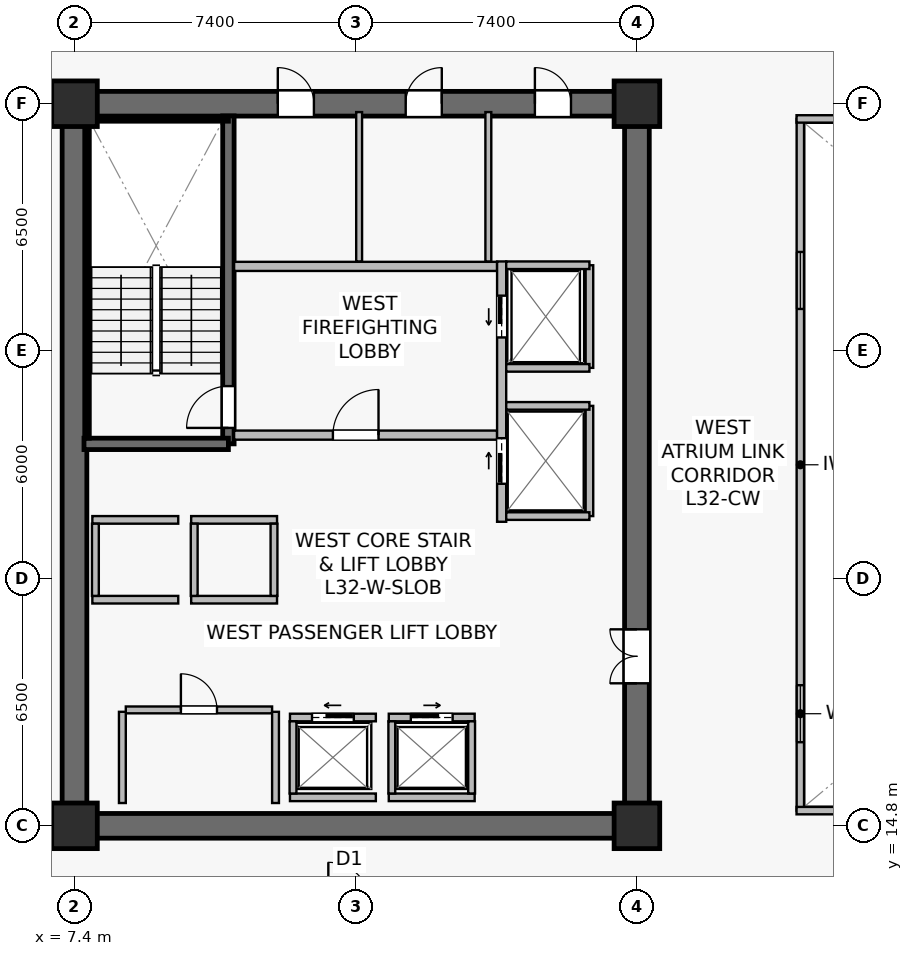
"""IFC4 building model, lengths in metres.
Left out: names, types, materials, properties, quantities, classifications, styles, units other than length and angle.
Written with IfcOpenShell. Run it as: python <this file> out.ifc"""

import sys

from ifc_helpers import new_model, si_unit, direction, frame, frame_2d, origin, origin_2d, place, context, subcontext, project, spatial, rectangle, extrude, source, transform, mapped, element, fill, save


model = new_model("IFC4")
c1 = context("Model", 3, precision=1e-05, world=origin(), true_north=direction((0.0, 1.0)))
c2 = subcontext(c1, "Body", "Model", "MODEL_VIEW")
j1 = project(units=[si_unit("LENGTHUNIT", "METRE"), si_unit("PLANEANGLEUNIT", "RADIAN")], contexts=[c1])
p1 = place(None, origin())
s1 = spatial("IfcSite", under=j1, at=p1, CompositionType="ELEMENT")
p2 = place(p1, origin())
s2 = spatial("IfcBuilding", under=s1, at=p2, CompositionType="ELEMENT")
p3 = place(p2, frame((0.0, 0.0, 133.8)))
s3 = spatial("IfcBuildingStorey", under=s2, at=p3, CompositionType="ELEMENT", Elevation=133.8)
p4 = place(p3, frame((7.075, 14.8, 0.0), z_axis=(0.0, 0.0, 1.0), x_axis=(1.0, 0.0, 0.0)))
e1 = element("IfcWall", 1, at=p4, inside=s3, PredefinedType="SHEAR", context=c2, shape_type="SweptSolid", body=[
    extrude(rectangle(XDim=15.45, YDim=0.65, at=frame_2d((7.725, 0.0))), origin(), (0.0, 0.0, 1.0), 3.79),
])
p5 = place(p3, frame((7.075, 33.8, 0.0), z_axis=(0.0, 0.0, 1.0), x_axis=(1.0, 0.0, 0.0)))
e2 = element("IfcWall", 2, at=p5, inside=s3, PredefinedType="SHEAR", context=c2, shape_type="SweptSolid", body=[
    extrude(rectangle(XDim=15.45, YDim=0.65, at=frame_2d((7.725, 0.0))), origin(), (0.0, 0.0, 1.0), 3.79),
])
p6 = place(p5, frame((5.675, 0.0, 0.0)))
e3 = element("IfcOpeningElement", 3, at=p6, cuts=e2, PredefinedType="OPENING", context=c2, shape_type="SweptSolid", body=[
    extrude(rectangle(XDim=0.95, YDim=2.15, at=frame_2d((0.475, 1.075))), frame((0.0, 0.335, 0.0), z_axis=(0.0, -1.0, 0.0), x_axis=(1.0, 0.0, 0.0)), (0.0, 0.0, 1.0), 0.67),
])
p7 = place(p5, frame((9.04, 0.0, 0.0)))
e4 = element("IfcOpeningElement", 4, at=p7, cuts=e2, PredefinedType="OPENING", context=c2, shape_type="SweptSolid", body=[
    extrude(rectangle(XDim=0.95, YDim=2.15, at=frame_2d((0.475, 1.075))), frame((0.0, 0.335, 0.0), z_axis=(0.0, -1.0, 0.0), x_axis=(1.0, 0.0, 0.0)), (0.0, 0.0, 1.0), 0.67),
])
p8 = place(p5, frame((12.44, 0.0, 0.0)))
e5 = element("IfcOpeningElement", 5, at=p8, cuts=e2, PredefinedType="OPENING", context=c2, shape_type="SweptSolid", body=[
    extrude(rectangle(XDim=0.95, YDim=2.15, at=frame_2d((0.475, 1.075))), frame((0.0, 0.335, 0.0), z_axis=(0.0, -1.0, 0.0), x_axis=(1.0, 0.0, 0.0)), (0.0, 0.0, 1.0), 0.67),
])
p9 = place(p3, frame((7.4, 15.125, 0.0), z_axis=(0.0, 0.0, 1.0), x_axis=(0.0, 1.0, 0.0)))
e6 = element("IfcWall", 6, at=p9, inside=s3, PredefinedType="SHEAR", context=c2, shape_type="SweptSolid", body=[
    extrude(rectangle(XDim=18.35, YDim=0.65, at=frame_2d((9.175, 0.0))), origin(), (0.0, 0.0, 1.0), 3.79),
])
p10 = place(p3, frame((22.2, 15.125, 0.0), z_axis=(0.0, 0.0, 1.0), x_axis=(0.0, 1.0, 0.0)))
e7 = element("IfcWall", 7, at=p10, inside=s3, PredefinedType="SHEAR", context=c2, shape_type="SweptSolid", body=[
    extrude(rectangle(XDim=18.35, YDim=0.65, at=frame_2d((9.175, 0.0))), origin(), (0.0, 0.0, 1.0), 3.79),
])
p11 = place(p10, frame((3.425, 0.0, 0.0)))
e8 = element("IfcOpeningElement", 8, at=p11, cuts=e7, PredefinedType="OPENING", context=c2, shape_type="SweptSolid", body=[
    extrude(rectangle(XDim=1.42, YDim=2.2, at=frame_2d((0.71, 1.1))), frame((0.0, 0.335, 0.0), z_axis=(0.0, -1.0, 0.0), x_axis=(1.0, 0.0, 0.0)), (0.0, 0.0, 1.0), 0.67),
])
p12 = place(p3, frame((11.45, 24.85, 0.0), z_axis=(0.0, 0.0, 1.0), x_axis=(0.0, 1.0, 0.0)))
e9 = element("IfcWall", 9, at=p12, inside=s3, PredefinedType="SHEAR", context=c2, shape_type="SweptSolid", body=[
    extrude(rectangle(XDim=8.63, YDim=0.3, at=frame_2d((4.315, 0.0))), origin(), (0.0, 0.0, 1.0), 3.79),
])
p13 = place(p12, frame((0.42, 0.0, 0.0)))
e10 = element("IfcOpeningElement", 10, at=p13, cuts=e9, PredefinedType="OPENING", context=c2, shape_type="SweptSolid", body=[
    extrude(rectangle(XDim=1.1, YDim=2.15, at=frame_2d((0.55, 1.075))), frame((0.0, 0.16, 0.0), z_axis=(0.0, -1.0, 0.0), x_axis=(1.0, 0.0, 0.0)), (0.0, 0.0, 1.0), 0.32),
])
p14 = place(p3, frame((7.65, 24.85, 0.0), z_axis=(0.0, 0.0, 1.0), x_axis=(1.0, 0.0, 0.0)))
e11 = element("IfcWall", 11, at=p14, inside=s3, PredefinedType="SHEAR", context=c2, shape_type="SweptSolid", body=[
    extrude(rectangle(XDim=3.8, YDim=0.3, at=frame_2d((1.9, 0.0))), origin(), (0.0, 0.0, 1.0), 3.79),
])
p15 = place(p3, frame((7.73, 33.4, 0.0), z_axis=(0.0, 0.0, 1.0), x_axis=(1.0, 0.0, 0.0)))
e12 = element("IfcWall", 12, at=p15, inside=s3, PredefinedType="SOLIDWALL", context=c2, shape_type="SweptSolid", body=[
    extrude(rectangle(XDim=3.72, YDim=0.12, at=frame_2d((1.86, 0.0))), origin(), (0.0, 0.0, 1.0), 3.79),
])
p16 = place(p3, frame((7.73, 25.0, 0.0), z_axis=(0.0, 0.0, 1.0), x_axis=(0.0, 1.0, 0.0)))
e13 = element("IfcWall", 13, at=p16, inside=s3, PredefinedType="SOLIDWALL", context=c2, shape_type="SweptSolid", body=[
    extrude(rectangle(XDim=8.32, YDim=0.12, at=frame_2d((4.16, 0.0))), origin(), (0.0, 0.0, 1.0), 3.79),
])
m1 = source(origin(), c2, "Body", "SweptSolid", [
    extrude(rectangle(XDim=1.2, YDim=1.2, at=origin_2d()), origin(), (0.0, 0.0, 1.0), 4.1),
])
for number, where, z_axis, x_axis in (
    (14, (7.4, 14.8, 0.0), (0.0, 0.0, 1.0), (1.0, 0.0, 0.0)),
    (15, (22.2, 14.8, 0.0), (0.0, 0.0, 1.0), (1.0, 0.0, 0.0)),
    (16, (7.4, 33.8, 0.0), (0.0, 0.0, 1.0), (1.0, 0.0, 0.0)),
    (17, (22.2, 33.8, 0.0), (0.0, 0.0, 1.0), (1.0, 0.0, 0.0)),
):
    element("IfcColumn", number, at=place(p3, frame(where, z_axis=z_axis, x_axis=x_axis)), inside=s3, PredefinedType="COLUMN", context=c2, shape_type="MappedRepresentation", body=[
        mapped(m1, transform((0.0, 0.0, 0.0), scale=1.0)),
    ])
p17 = place(p3, frame((11.6, 25.08, 0.0), z_axis=(0.0, 0.0, 1.0), x_axis=(1.0, 0.0, 0.0)))
e18 = element("IfcWall", 18, at=p17, inside=s3, PredefinedType="SOLIDWALL", context=c2, shape_type="SweptSolid", body=[
    extrude(rectangle(XDim=6.92, YDim=0.24, at=frame_2d((3.46, 0.0))), origin(), (0.0, 0.0, 1.0), 3.125),
])
p18 = place(p17, frame((2.6, 0.0, 0.0)))
e19 = element("IfcOpeningElement", 19, at=p18, cuts=e18, PredefinedType="OPENING", context=c2, shape_type="SweptSolid", body=[
    extrude(rectangle(XDim=1.2, YDim=2.16, at=frame_2d((0.6, 1.08))), frame((0.0, 0.13, 0.0), z_axis=(0.0, -1.0, 0.0), x_axis=(1.0, 0.0, 0.0)), (0.0, 0.0, 1.0), 0.26),
])
p19 = place(p3, frame((11.6, 29.52, 0.0), z_axis=(0.0, 0.0, 1.0), x_axis=(1.0, 0.0, 0.0)))
e20 = element("IfcWall", 20, at=p19, inside=s3, PredefinedType="SOLIDWALL", context=c2, shape_type="SweptSolid", body=[
    extrude(rectangle(XDim=6.92, YDim=0.24, at=frame_2d((3.46, 0.0))), origin(), (0.0, 0.0, 1.0), 3.125),
])
p20 = place(p3, frame((18.64, 22.8, 0.0), z_axis=(0.0, 0.0, 1.0), x_axis=(0.0, 1.0, 0.0)))
e21 = element("IfcWall", 21, at=p20, inside=s3, PredefinedType="SOLIDWALL", context=c2, shape_type="SweptSolid", body=[
    extrude(rectangle(XDim=6.85, YDim=0.24, at=frame_2d((3.425, 0.0))), origin(), (0.0, 0.0, 1.0), 2.875),
])
p21 = place(p20, frame((4.85, 0.0, 0.0)))
e22 = element("IfcOpeningElement", 22, at=p21, cuts=e21, PredefinedType="OPENING", context=c2, shape_type="SweptSolid", body=[
    extrude(rectangle(XDim=1.1, YDim=2.22, at=frame_2d((0.55, 1.11))), frame((0.0, 0.13, 0.0), z_axis=(0.0, -1.0, 0.0), x_axis=(1.0, 0.0, 0.0)), (0.0, 0.0, 1.0), 0.26),
])
p22 = place(p20, frame((1.0, 0.0, 0.0)))
e23 = element("IfcOpeningElement", 23, at=p22, cuts=e21, PredefinedType="OPENING", context=c2, shape_type="SweptSolid", body=[
    extrude(rectangle(XDim=1.2, YDim=2.22, at=frame_2d((0.6, 1.11))), frame((0.0, 0.13, 0.0), z_axis=(0.0, -1.0, 0.0), x_axis=(1.0, 0.0, 0.0)), (0.0, 0.0, 1.0), 0.26),
])
p23 = place(p3, frame((13.07, 17.65, 0.0), z_axis=(0.0, 0.0, 1.0), x_axis=(1.0, 0.0, 0.0)))
e24 = element("IfcWall", 24, at=p23, inside=s3, PredefinedType="SOLIDWALL", context=c2, shape_type="SweptSolid", body=[
    extrude(rectangle(XDim=2.26, YDim=0.2, at=frame_2d((1.13, 0.0))), origin(), (0.0, 0.0, 1.0), 3.125),
])
p24 = place(p23, frame((0.58, 0.0, 0.0)))
e25 = element("IfcOpeningElement", 25, at=p24, cuts=e24, PredefinedType="OPENING", context=c2, shape_type="SweptSolid", body=[
    extrude(rectangle(XDim=1.1, YDim=2.22, at=frame_2d((0.55, 1.11))), frame((0.0, 0.11, 0.0), z_axis=(0.0, -1.0, 0.0), x_axis=(1.0, 0.0, 0.0)), (0.0, 0.0, 1.0), 0.22),
])
p25 = place(p3, frame((13.07, 15.55, 0.0), z_axis=(0.0, 0.0, 1.0), x_axis=(1.0, 0.0, 0.0)))
e26 = element("IfcWall", 26, at=p25, inside=s3, PredefinedType="SOLIDWALL", context=c2, shape_type="SweptSolid", body=[
    extrude(rectangle(XDim=2.26, YDim=0.2, at=frame_2d((1.13, 0.0))), origin(), (0.0, 0.0, 1.0), 3.125),
])
p26 = place(p3, frame((13.15, 15.65, 0.0), z_axis=(0.0, 0.0, 1.0), x_axis=(0.0, 1.0, 0.0)))
e27 = element("IfcWall", 27, at=p26, inside=s3, PredefinedType="SOLIDWALL", context=c2, shape_type="SweptSolid", body=[
    extrude(rectangle(XDim=1.9, YDim=0.18, at=frame_2d((0.95, 0.0))), origin(), (0.0, 0.0, 1.0), 3.79),
])
p27 = place(p3, frame((15.67, 17.65, 0.0), z_axis=(0.0, 0.0, 1.0), x_axis=(1.0, 0.0, 0.0)))
e28 = element("IfcWall", 28, at=p27, inside=s3, PredefinedType="SOLIDWALL", context=c2, shape_type="SweptSolid", body=[
    extrude(rectangle(XDim=2.26, YDim=0.2, at=frame_2d((1.13, 0.0))), origin(), (0.0, 0.0, 1.0), 3.79),
])
p28 = place(p27, frame((0.58, 0.0, 0.0)))
e29 = element("IfcOpeningElement", 29, at=p28, cuts=e28, PredefinedType="OPENING", context=c2, shape_type="SweptSolid", body=[
    extrude(rectangle(XDim=1.1, YDim=2.22, at=frame_2d((0.55, 1.11))), frame((0.0, 0.11, 0.0), z_axis=(0.0, -1.0, 0.0), x_axis=(1.0, 0.0, 0.0)), (0.0, 0.0, 1.0), 0.22),
])
p29 = place(p3, frame((15.67, 15.55, 0.0), z_axis=(0.0, 0.0, 1.0), x_axis=(1.0, 0.0, 0.0)))
e30 = element("IfcWall", 30, at=p29, inside=s3, PredefinedType="SOLIDWALL", context=c2, shape_type="SweptSolid", body=[
    extrude(rectangle(XDim=2.26, YDim=0.2, at=frame_2d((1.13, 0.0))), origin(), (0.0, 0.0, 1.0), 3.79),
])
for number, where, z_axis, x_axis in (
    (31, (15.75, 15.65, 0.0), (0.0, 0.0, 1.0), (0.0, 1.0, 0.0)),
    (32, (17.85, 15.65, 0.0), (0.0, 0.0, 1.0), (0.0, 1.0, 0.0)),
):
    element("IfcWall", number, at=place(p3, frame(where, z_axis=z_axis, x_axis=x_axis)), inside=s3, PredefinedType="SOLIDWALL", context=c2, shape_type="SweptSolid", body=[
        extrude(rectangle(XDim=1.9, YDim=0.18, at=frame_2d((0.95, 0.0))), origin(), (0.0, 0.0, 1.0), 3.79),
    ])
for number, where, z_axis, x_axis in (
    (33, (7.87, 20.75, 0.0), (0.0, 0.0, 1.0), (1.0, 0.0, 0.0)),
    (34, (7.87, 22.85, 0.0), (0.0, 0.0, 1.0), (1.0, 0.0, 0.0)),
):
    element("IfcWall", number, at=place(p3, frame(where, z_axis=z_axis, x_axis=x_axis)), inside=s3, PredefinedType="SOLIDWALL", context=c2, shape_type="SweptSolid", body=[
        extrude(rectangle(XDim=2.26, YDim=0.2, at=frame_2d((1.13, 0.0))), origin(), (0.0, 0.0, 1.0), 3.79),
    ])
p30 = place(p3, frame((7.95, 20.85, 0.0), z_axis=(0.0, 0.0, 1.0), x_axis=(0.0, 1.0, 0.0)))
e35 = element("IfcWall", 35, at=p30, inside=s3, PredefinedType="SOLIDWALL", context=c2, shape_type="SweptSolid", body=[
    extrude(rectangle(XDim=1.9, YDim=0.18, at=frame_2d((0.95, 0.0))), origin(), (0.0, 0.0, 1.0), 3.79),
])
for number, where, z_axis, x_axis in (
    (36, (10.47, 20.75, 0.0), (0.0, 0.0, 1.0), (1.0, 0.0, 0.0)),
    (37, (10.47, 22.85, 0.0), (0.0, 0.0, 1.0), (1.0, 0.0, 0.0)),
):
    element("IfcWall", number, at=place(p3, frame(where, z_axis=z_axis, x_axis=x_axis)), inside=s3, PredefinedType="SOLIDWALL", context=c2, shape_type="SweptSolid", body=[
        extrude(rectangle(XDim=2.26, YDim=0.2, at=frame_2d((1.13, 0.0))), origin(), (0.0, 0.0, 1.0), 3.79),
    ])
for number, where, z_axis, x_axis in (
    (38, (10.55, 20.85, 0.0), (0.0, 0.0, 1.0), (0.0, 1.0, 0.0)),
    (39, (12.65, 20.85, 0.0), (0.0, 0.0, 1.0), (0.0, 1.0, 0.0)),
):
    element("IfcWall", number, at=place(p3, frame(where, z_axis=z_axis, x_axis=x_axis)), inside=s3, PredefinedType="SOLIDWALL", context=c2, shape_type="SweptSolid", body=[
        extrude(rectangle(XDim=1.9, YDim=0.18, at=frame_2d((0.95, 0.0))), origin(), (0.0, 0.0, 1.0), 3.79),
    ])
p31 = place(p3, frame((20.95, 26.85, 0.0), z_axis=(0.0, 0.0, 1.0), x_axis=(0.0, 1.0, 0.0)))
e40 = element("IfcWall", 40, at=p31, inside=s3, PredefinedType="SOLIDWALL", context=c2, shape_type="SweptSolid", body=[
    extrude(rectangle(XDim=2.7, YDim=0.2, at=frame_2d((1.35, 0.0))), origin(), (0.0, 0.0, 1.0), 3.79),
])
p32 = place(p3, frame((18.76, 29.55, 0.0), z_axis=(0.0, 0.0, 1.0), x_axis=(1.0, 0.0, 0.0)))
e41 = element("IfcWall", 41, at=p32, inside=s3, PredefinedType="SOLIDWALL", context=c2, shape_type="SweptSolid", body=[
    extrude(rectangle(XDim=2.19, YDim=0.2, at=frame_2d((1.095, 0.0))), origin(), (0.0, 0.0, 1.0), 3.79),
])
p33 = place(p3, frame((18.76, 26.85, 0.0), z_axis=(0.0, 0.0, 1.0), x_axis=(1.0, 0.0, 0.0)))
e42 = element("IfcWall", 42, at=p33, inside=s3, PredefinedType="SOLIDWALL", context=c2, shape_type="SweptSolid", body=[
    extrude(rectangle(XDim=2.19, YDim=0.2, at=frame_2d((1.095, 0.0))), origin(), (0.0, 0.0, 1.0), 3.187),
])
p34 = place(p3, frame((20.95, 22.95, 0.0), z_axis=(0.0, 0.0, 1.0), x_axis=(0.0, 1.0, 0.0)))
e43 = element("IfcWall", 43, at=p34, inside=s3, PredefinedType="SOLIDWALL", context=c2, shape_type="SweptSolid", body=[
    extrude(rectangle(XDim=2.9, YDim=0.2, at=frame_2d((1.45, 0.0))), origin(), (0.0, 0.0, 1.0), 2.875),
])
for number, where, z_axis, x_axis in (
    (44, (18.76, 25.85, 0.0), (0.0, 0.0, 1.0), (1.0, 0.0, 0.0)),
    (45, (18.76, 22.95, 0.0), (0.0, 0.0, 1.0), (1.0, 0.0, 0.0)),
):
    element("IfcWall", number, at=place(p3, frame(where, z_axis=z_axis, x_axis=x_axis)), inside=s3, PredefinedType="SOLIDWALL", context=c2, shape_type="SweptSolid", body=[
        extrude(rectangle(XDim=2.19, YDim=0.2, at=frame_2d((1.095, 0.0))), origin(), (0.0, 0.0, 1.0), 3.79),
    ])
p35 = place(p3, frame((8.75, 17.85, 0.0), z_axis=(0.0, 0.0, 1.0), x_axis=(1.0, 0.0, 0.0)))
e46 = element("IfcWall", 46, at=p35, inside=s3, PredefinedType="SOLIDWALL", context=c2, shape_type="SweptSolid", body=[
    extrude(rectangle(XDim=3.85, YDim=0.18, at=frame_2d((1.925, 0.0))), origin(), (0.0, 0.0, 1.0), 3.79),
])
p36 = place(p35, frame((1.45, 0.0, 0.0)))
e47 = element("IfcOpeningElement", 47, at=p36, cuts=e46, PredefinedType="OPENING", context=c2, shape_type="SweptSolid", body=[
    extrude(rectangle(XDim=0.95, YDim=2.15, at=frame_2d((0.475, 1.075))), frame((0.0, 0.1, 0.0), z_axis=(0.0, -1.0, 0.0), x_axis=(1.0, 0.0, 0.0)), (0.0, 0.0, 1.0), 0.2),
])
for number, where, z_axis, x_axis in (
    (48, (12.69, 15.4, 0.0), (0.0, 0.0, 1.0), (0.0, 1.0, 0.0)),
    (49, (8.66, 15.4, 0.0), (0.0, 0.0, 1.0), (0.0, 1.0, 0.0)),
):
    element("IfcWall", number, at=place(p3, frame(where, z_axis=z_axis, x_axis=x_axis)), inside=s3, PredefinedType="SOLIDWALL", context=c2, shape_type="SweptSolid", body=[
        extrude(rectangle(XDim=2.4, YDim=0.18, at=frame_2d((1.2, 0.0))), origin(), (0.0, 0.0, 1.0), 3.79),
    ])
p37 = place(p3, frame((14.89, 29.65, 0.0), z_axis=(0.0, 0.0, 1.0), x_axis=(0.0, 1.0, 0.0)))
e50 = element("IfcWall", 50, at=p37, inside=s3, PredefinedType="PLUMBINGWALL", context=c2, shape_type="SweptSolid", body=[
    extrude(rectangle(XDim=3.93, YDim=0.155, at=frame_2d((1.965, 0.0))), origin(), (0.0, 0.0, 1.0), 3.125),
])
p38 = place(p3, frame((18.29, 29.65, 0.0), z_axis=(0.0, 0.0, 1.0), x_axis=(0.0, 1.0, 0.0)))
e51 = element("IfcWall", 51, at=p38, inside=s3, PredefinedType="PLUMBINGWALL", context=c2, shape_type="SweptSolid", body=[
    extrude(rectangle(XDim=3.93, YDim=0.155, at=frame_2d((1.965, 0.0))), origin(), (0.0, 0.0, 1.0), 3.79),
])
p39 = place(p3, frame((26.5, 15.2, 0.0), z_axis=(0.0, 0.0, 1.0), x_axis=(0.0, 1.0, 0.0)))
e52 = element("IfcWall", 52, at=p39, inside=s3, PredefinedType="SOLIDWALL", context=c2, shape_type="SweptSolid", body=[
    extrude(rectangle(XDim=18.2, YDim=0.195, at=frame_2d((9.1, 0.0))), origin(), (0.0, 0.0, 1.0), 3.79),
])
p40 = place(p39, frame((1.8, 0.0, 0.9)))
e53 = element("IfcOpeningElement", 53, at=p40, cuts=e52, PredefinedType="OPENING", context=c2, shape_type="SweptSolid", body=[
    extrude(rectangle(XDim=1.5, YDim=1.4, at=frame_2d((0.75, 0.7))), frame((0.0, 0.107, 0.0), z_axis=(0.0, -1.0, 0.0), x_axis=(1.0, 0.0, 0.0)), (0.0, 0.0, 1.0), 0.215),
])
p41 = place(p39, frame((13.2, 0.0, 0.9)))
e54 = element("IfcOpeningElement", 54, at=p41, cuts=e52, PredefinedType="OPENING", context=c2, shape_type="SweptSolid", body=[
    extrude(rectangle(XDim=1.5, YDim=1.4, at=frame_2d((0.75, 0.7))), frame((0.0, 0.107, 0.0), z_axis=(0.0, -1.0, 0.0), x_axis=(1.0, 0.0, 0.0)), (0.0, 0.0, 1.0), 0.215),
])
for number, where, z_axis, x_axis in (
    (55, (26.4, 15.2, 0.0), (0.0, 0.0, 1.0), (1.0, 0.0, 0.0)),
    (56, (26.4, 33.4, 0.0), (0.0, 0.0, 1.0), (1.0, 0.0, 0.0)),
):
    element("IfcWall", number, at=place(p3, frame(where, z_axis=z_axis, x_axis=x_axis)), inside=s3, PredefinedType="SOLIDWALL", context=c2, shape_type="SweptSolid", body=[
        extrude(rectangle(XDim=22.0, YDim=0.195, at=frame_2d((11.0, 0.0))), origin(), (0.0, 0.0, 1.0), 3.79),
    ])
m2 = source(origin(), c2, "Body", "SweptSolid", [
    extrude(rectangle(XDim=1.5, YDim=1.4, at=frame_2d((0.75, 0.7))), frame((0.0, 0.03, 0.0), z_axis=(0.0, -1.0, 0.0), x_axis=(1.0, 0.0, 0.0)), (0.0, 0.0, 1.0), 0.06),
])
p42 = place(p40, origin())
e57 = element("IfcWindow", 57, at=p42, inside=s3, PartitioningType="SINGLE_PANEL", PredefinedType="WINDOW", context=c2, shape_type="MappedRepresentation", body=[
    mapped(m2, transform((0.0, 0.0, 0.0), scale=1.0)),
])
fill(e53, e57)
p43 = place(p41, origin())
e58 = element("IfcWindow", 58, at=p43, inside=s3, PartitioningType="SINGLE_PANEL", PredefinedType="WINDOW", context=c2, shape_type="MappedRepresentation", body=[
    mapped(m2, transform((0.0, 0.0, 0.0), scale=1.0)),
])
fill(e54, e58)
m3 = source(origin(), c2, "Body", "SweptSolid", [
    extrude(rectangle(XDim=1.1, YDim=2.15, at=frame_2d((0.55, 1.075))), frame((0.0, 0.025, 0.0), z_axis=(0.0, -1.0, 0.0), x_axis=(1.0, 0.0, 0.0)), (0.0, 0.0, 1.0), 0.05),
])
p44 = place(p13, origin())
e59 = element("IfcDoor", 59, at=p44, inside=s3, OperationType="SINGLE_SWING_LEFT", PredefinedType="DOOR", context=c2, shape_type="MappedRepresentation", body=[
    mapped(m3, transform((0.0, 0.0, 0.0), scale=1.0)),
])
fill(e10, e59)
m4 = source(origin(), c2, "Body", "SweptSolid", [
    extrude(rectangle(XDim=1.2, YDim=2.16, at=frame_2d((0.6, 1.08))), frame((0.0, 0.025, 0.0), z_axis=(0.0, -1.0, 0.0), x_axis=(1.0, 0.0, 0.0)), (0.0, 0.0, 1.0), 0.05),
])
p45 = place(p18, origin())
e60 = element("IfcDoor", 60, at=p45, inside=s3, OperationType="SINGLE_SWING_RIGHT", PredefinedType="DOOR", context=c2, shape_type="MappedRepresentation", body=[
    mapped(m4, transform((0.0, 0.0, 0.0), scale=1.0)),
])
fill(e19, e60)
m5 = source(origin(), c2, "Body", "SweptSolid", [
    extrude(rectangle(XDim=1.1, YDim=2.22, at=frame_2d((0.55, 1.11))), frame((0.0, 0.025, 0.0), z_axis=(0.0, -1.0, 0.0), x_axis=(1.0, 0.0, 0.0)), (0.0, 0.0, 1.0), 0.05),
])
p46 = place(p24, origin())
e61 = element("IfcDoor", 61, at=p46, inside=s3, OperationType="SLIDING_TO_LEFT", PredefinedType="USERDEFINED", context=c2, shape_type="MappedRepresentation", body=[
    mapped(m5, transform((0.0, 0.0, 0.0), scale=1.0)),
])
fill(e25, e61)
p47 = place(p28, origin())
e62 = element("IfcDoor", 62, at=p47, inside=s3, OperationType="SLIDING_TO_RIGHT", PredefinedType="USERDEFINED", context=c2, shape_type="MappedRepresentation", body=[
    mapped(m5, transform((0.0, 0.0, 0.0), scale=1.0)),
])
fill(e29, e62)
p48 = place(p21, origin())
e63 = element("IfcDoor", 63, at=p48, inside=s3, OperationType="SLIDING_TO_LEFT", PredefinedType="USERDEFINED", context=c2, shape_type="MappedRepresentation", body=[
    mapped(m5, transform((0.0, 0.0, 0.0), scale=1.0)),
])
fill(e22, e63)
m6 = source(origin(), c2, "Body", "SweptSolid", [
    extrude(rectangle(XDim=1.2, YDim=2.22, at=frame_2d((0.6, 1.11))), frame((0.0, 0.025, 0.0), z_axis=(0.0, -1.0, 0.0), x_axis=(1.0, 0.0, 0.0)), (0.0, 0.0, 1.0), 0.05),
])
p49 = place(p22, origin())
e64 = element("IfcDoor", 64, at=p49, inside=s3, OperationType="SLIDING_TO_RIGHT", PredefinedType="USERDEFINED", context=c2, shape_type="MappedRepresentation", body=[
    mapped(m6, transform((0.0, 0.0, 0.0), scale=1.0)),
])
fill(e23, e64)
m7 = source(origin(), c2, "Body", "SweptSolid", [
    extrude(rectangle(XDim=0.95, YDim=2.15, at=frame_2d((0.475, 1.075))), frame((0.0, 0.025, 0.0), z_axis=(0.0, -1.0, 0.0), x_axis=(1.0, 0.0, 0.0)), (0.0, 0.0, 1.0), 0.05),
])
p50 = place(p36, origin())
e65 = element("IfcDoor", 65, at=p50, inside=s3, OperationType="SINGLE_SWING_LEFT", PredefinedType="DOOR", context=c2, shape_type="MappedRepresentation", body=[
    mapped(m7, transform((0.0, 0.0, 0.0), scale=1.0)),
])
fill(e47, e65)
m8 = source(origin(), c2, "Body", "SweptSolid", [
    extrude(rectangle(XDim=1.42, YDim=2.2, at=frame_2d((0.71, 1.1))), frame((0.0, 0.025, 0.0), z_axis=(0.0, -1.0, 0.0), x_axis=(1.0, 0.0, 0.0)), (0.0, 0.0, 1.0), 0.05),
])
p51 = place(p11, origin())
e66 = element("IfcDoor", 66, at=p51, inside=s3, OperationType="DOUBLE_DOOR_SINGLE_SWING", PredefinedType="DOOR", context=c2, shape_type="MappedRepresentation", body=[
    mapped(m8, transform((0.0, 0.0, 0.0), scale=1.0)),
])
fill(e8, e66)
p52 = place(p6, origin())
e67 = element("IfcDoor", 67, at=p52, inside=s3, OperationType="SINGLE_SWING_LEFT", PredefinedType="DOOR", context=c2, shape_type="MappedRepresentation", body=[
    mapped(m7, transform((0.0, 0.0, 0.0), scale=1.0)),
])
fill(e3, e67)
p53 = place(p7, origin())
e68 = element("IfcDoor", 68, at=p53, inside=s3, OperationType="SINGLE_SWING_RIGHT", PredefinedType="DOOR", context=c2, shape_type="MappedRepresentation", body=[
    mapped(m7, transform((0.0, 0.0, 0.0), scale=1.0)),
])
fill(e4, e68)
p54 = place(p8, origin())
e69 = element("IfcDoor", 69, at=p54, inside=s3, OperationType="SINGLE_SWING_LEFT", PredefinedType="DOOR", context=c2, shape_type="MappedRepresentation", body=[
    mapped(m7, transform((0.0, 0.0, 0.0), scale=1.0)),
])
fill(e5, e69)
save(model, sys.argv[1])
